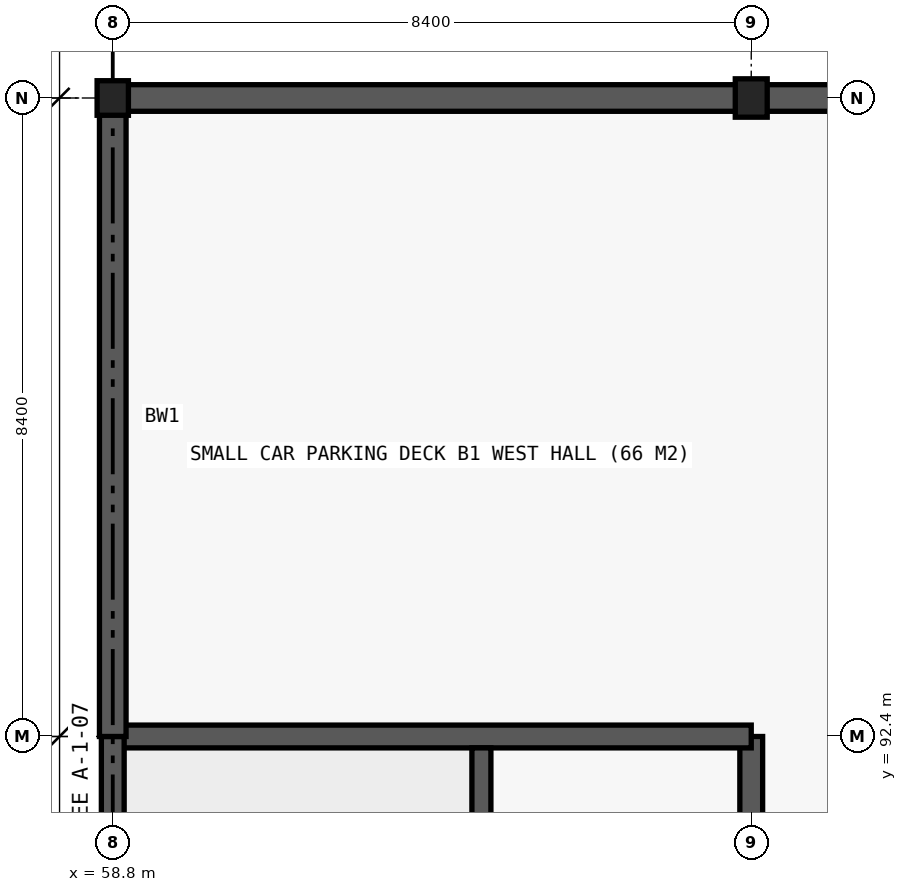
"""IFC4 building model, lengths in metres.
Left out: names, types, materials, properties, quantities, classifications, styles, units other than length and angle.
Written with IfcOpenShell. Run it as: python <this file> out.ifc"""

import sys

from ifc_helpers import new_model, si_unit, direction, frame, frame_2d, origin, origin_2d, place, context, subcontext, project, spatial, rectangle, i_section, extrude, element, save


model = new_model("IFC4")
c1 = context("Model", 3, precision=1e-05, world=origin(), true_north=direction((0.0, 1.0)))
c2 = subcontext(c1, "Body", "Model", "MODEL_VIEW")
j1 = project(units=[si_unit("LENGTHUNIT", "METRE"), si_unit("PLANEANGLEUNIT", "RADIAN")], contexts=[c1])
p1 = place(None, origin())
s1 = spatial("IfcSite", under=j1, at=p1, CompositionType="ELEMENT")
p2 = place(p1, origin())
s2 = spatial("IfcBuilding", under=s1, at=p2, CompositionType="ELEMENT")
p3 = place(p2, frame((0.0, 0.0, -4.5)))
s3 = spatial("IfcBuildingStorey", under=s2, at=p3, CompositionType="ELEMENT", Elevation=-4.5)
p4 = place(p3, frame((67.2, 84.0, -0.35), z_axis=(0.0, 0.0, 1.0), x_axis=(0.0, 1.0, 0.0)))
e1 = element("IfcWall", 1, at=p4, inside=s3, PredefinedType="SHEAR", context=c2, shape_type="SweptSolid", body=[
    extrude(rectangle(XDim=8.4, YDim=0.3, at=frame_2d((4.2, 0.0))), origin(), (0.0, 0.0, 1.0), 4.85),
])
p5 = place(p4, frame((4.55, 0.0, 0.35)))
e2 = element("IfcOpeningElement", 2, at=p5, cuts=e1, PredefinedType="OPENING", context=c2, shape_type="SweptSolid", body=[
    extrude(rectangle(XDim=1.1, YDim=2.2, at=frame_2d((0.55, 1.1))), frame((0.0, 0.16, 0.0), z_axis=(0.0, -1.0, 0.0), x_axis=(1.0, 0.0, 0.0)), (0.0, 0.0, 1.0), 0.32),
])
for number, where, z_axis, x_axis in (
    (3, (67.2, 92.4, -0.35), (0.0, 0.0, 1.0), (-1.0, 0.0, 0.0)),
    (4, (58.8, 92.4, -0.35), (0.0, 0.0, 1.0), (0.0, -1.0, 0.0)),
):
    element("IfcWall", number, at=place(p3, frame(where, z_axis=z_axis, x_axis=x_axis)), inside=s3, PredefinedType="SHEAR", context=c2, shape_type="SweptSolid", body=[
        extrude(rectangle(XDim=8.4, YDim=0.3, at=frame_2d((4.2, 0.0))), origin(), (0.0, 0.0, 1.0), 4.85),
    ])
p6 = place(p3, frame((63.65, 84.15, -0.35), z_axis=(0.0, 0.0, 1.0), x_axis=(0.0, 1.0, 0.0)))
e5 = element("IfcWall", 5, at=p6, inside=s3, PredefinedType="SHEAR", context=c2, shape_type="SweptSolid", body=[
    extrude(rectangle(XDim=8.1, YDim=0.25, at=frame_2d((4.05, 0.0))), origin(), (0.0, 0.0, 1.0), 4.85),
])
p7 = place(p3, frame((58.8, 100.8, -0.35), z_axis=(0.0, 0.0, 1.0), x_axis=(0.0, -1.0, 0.0)))
e6 = element("IfcWall", 6, at=p7, inside=s3, PredefinedType="SOLIDWALL", context=c2, shape_type="SweptSolid", body=[
    extrude(rectangle(XDim=8.4, YDim=0.35, at=frame_2d((4.2, 0.0))), origin(), (0.0, 0.0, 1.0), 4.6),
])
p8 = place(p3, frame((58.8, 100.8, -0.35), z_axis=(0.0, 0.0, 1.0), x_axis=(1.0, 0.0, 0.0)))
e7 = element("IfcWall", 7, at=p8, inside=s3, PredefinedType="SOLIDWALL", context=c2, shape_type="SweptSolid", body=[
    extrude(rectangle(XDim=8.4, YDim=0.35, at=frame_2d((4.2, 0.0))), origin(), (0.0, 0.0, 1.0), 4.6),
])
p9 = place(p3, frame((67.2, 100.8, -0.35), z_axis=(0.0, 0.0, 1.0), x_axis=(1.0, 0.0, 0.0)))
e8 = element("IfcWall", 8, at=p9, inside=s3, PredefinedType="SOLIDWALL", context=c2, shape_type="SweptSolid", body=[
    extrude(rectangle(XDim=8.4, YDim=0.35, at=frame_2d((4.2, 0.0))), origin(), (0.0, 0.0, 1.0), 4.6),
])
p10 = place(p3, frame((58.8, 100.8, -0.35), z_axis=(0.0, 0.0, 1.0), x_axis=(1.0, 0.0, 0.0)))
e9 = element("IfcColumn", 9, at=p10, inside=s3, PredefinedType="COLUMN", context=c2, shape_type="SweptSolid", body=[
    extrude(i_section(OverallWidth=0.412, OverallDepth=0.455, WebThickness=0.031, FlangeThickness=0.049, FilletRadius=0.015, at=origin_2d()), origin(), (0.0, 0.0, 1.0), 4.85),
])
p11 = place(p3, frame((67.2, 100.8, -0.35), z_axis=(0.0, 0.0, 1.0), x_axis=(1.0, 0.0, 0.0)))
e10 = element("IfcColumn", 10, at=p11, inside=s3, PredefinedType="COLUMN", context=c2, shape_type="SweptSolid", body=[
    extrude(i_section(OverallWidth=0.42, OverallDepth=0.505, WebThickness=0.037, FlangeThickness=0.059, FilletRadius=0.015, at=origin_2d()), origin(), (0.0, 0.0, 1.0), 4.85),
])
save(model, sys.argv[1])
